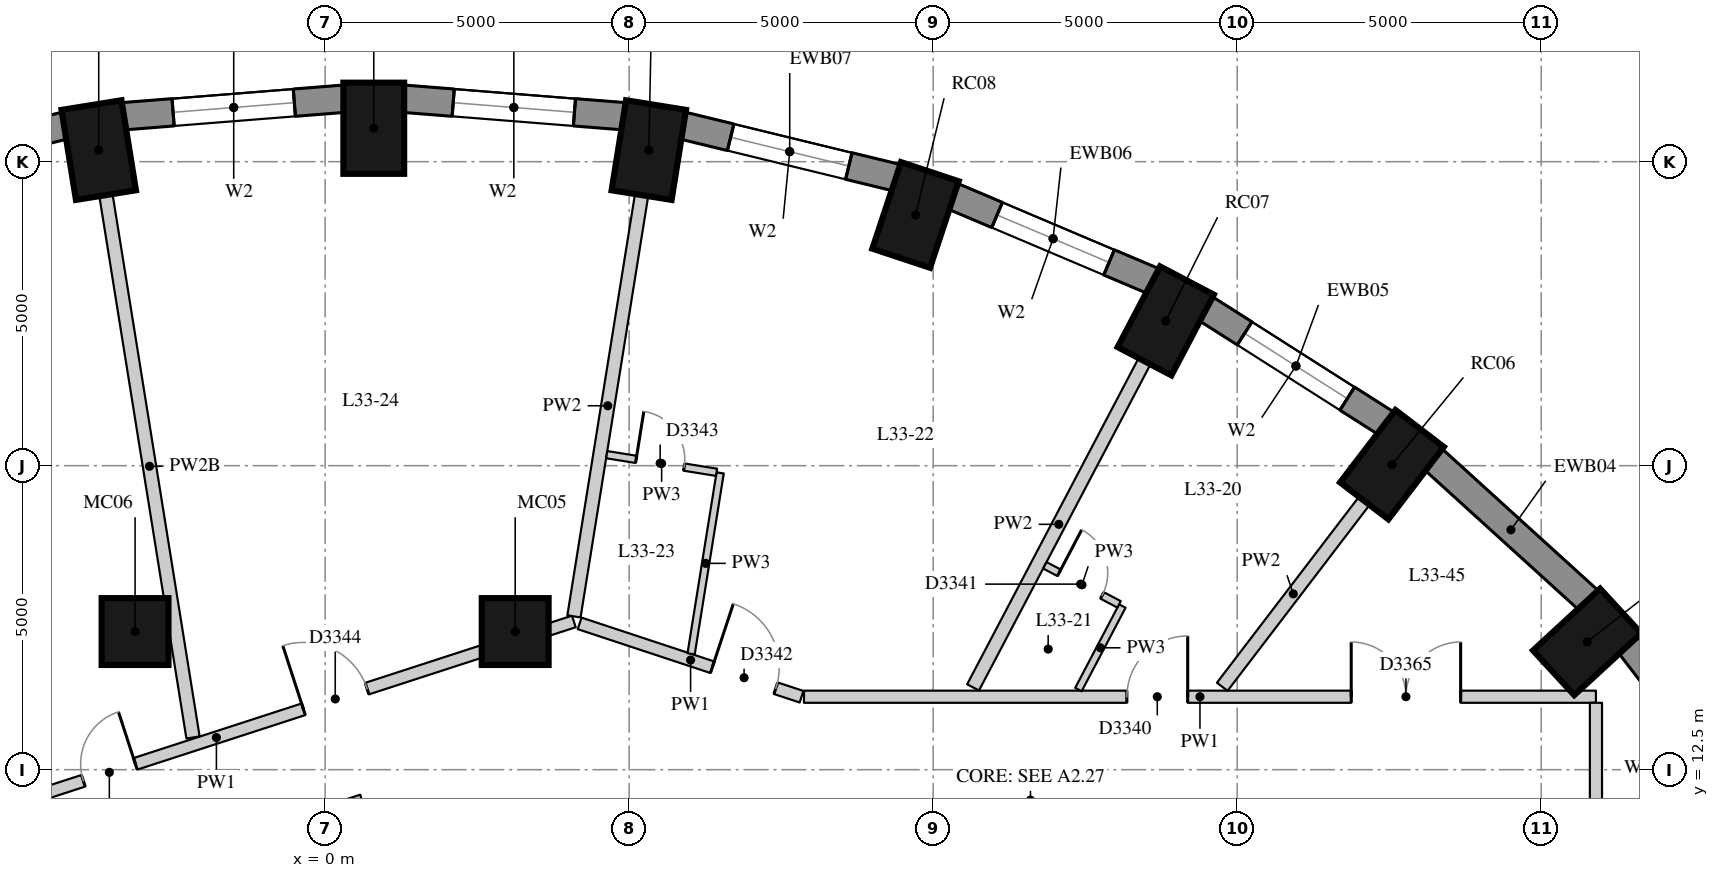
"""IFC4 building model, lengths in metres.
Left out: names, types, materials, properties, quantities, classifications, styles, units other than length and angle.
Written with IfcOpenShell. Run it as: python <this file> out.ifc"""

import sys

from ifc_helpers import new_model, si_unit, direction, frame, frame_2d, origin, origin_2d, place, context, subcontext, project, spatial, rectangle, extrude, element, fill, save


model = new_model("IFC4")
c1 = context("Model", 3, precision=1e-05, world=origin(), true_north=direction((0.0, 1.0)))
c2 = subcontext(c1, "Body", "Model", "MODEL_VIEW")
j1 = project(units=[si_unit("LENGTHUNIT", "METRE"), si_unit("PLANEANGLEUNIT", "RADIAN")], contexts=[c1])
p1 = place(None, origin())
s1 = spatial("IfcSite", under=j1, at=p1, CompositionType="ELEMENT")
p2 = place(p1, origin())
s2 = spatial("IfcBuilding", under=s1, at=p2, CompositionType="ELEMENT")
p3 = place(p2, frame((0.0, 0.0, 118.6)))
s3 = spatial("IfcBuildingStorey", under=s2, at=p3, CompositionType="ELEMENT", Elevation=118.6)
for number, where, z_axis, x_axis in (
    (1, (20.755, 14.602, 0.0), (0.0, 0.0, 1.0), (0.735, 0.678, 0.0)),
    (2, (17.545, 17.517, 0.0), (0.0, 0.0, 1.0), (0.607, 0.795, 0.0)),
    (3, (13.825, 19.882, 0.0), (0.0, 0.0, 1.0), (0.465, 0.885, 0.0)),
    (4, (9.71, 21.624, 0.0), (0.0, 0.0, 1.0), (0.315, 0.949, 0.0)),
    (5, (5.323, 22.691, 0.0), (0.0, 0.0, 1.0), (0.159, 0.987, 0.0)),
    (6, (0.8, 23.05, 0.0), (0.0, 0.0, 1.0), (0.0, 1.0, 0.0)),
    (7, (-3.724, 22.691, 0.0), (0.0, 0.0, 1.0), (-0.159, 0.987, 0.0)),
):
    element("IfcColumn", number, at=place(p3, frame(where, z_axis=z_axis, x_axis=x_axis)), inside=s3, PredefinedType="COLUMN", context=c2, shape_type="SweptSolid", body=[
        extrude(rectangle(XDim=1.5, YDim=1.0, at=origin_2d()), origin(), (0.0, 0.0, 1.0), 3.3),
    ])
for number, where, z_axis, x_axis in (
    (8, (3.126, 14.772, 0.0), (0.0, 0.0, 1.0), (1.0, 0.0, 0.0)),
    (9, (-3.126, 14.772, 0.0), (0.0, 0.0, 1.0), (1.0, 0.0, 0.0)),
):
    element("IfcColumn", number, at=place(p3, frame(where, z_axis=z_axis, x_axis=x_axis)), inside=s3, PredefinedType="COLUMN", context=c2, shape_type="SweptSolid", body=[
        extrude(rectangle(XDim=1.1, YDim=1.1, at=origin_2d()), origin(), (0.0, 0.0, 1.0), 3.3),
    ])
p4 = place(p3, frame((23.508, 11.887, 0.0), z_axis=(0.0, 0.0, 1.0), x_axis=(-0.610693945156, 0.791866721961, 0.0)))
e10 = element("IfcWall", 10, at=p4, inside=s3, PredefinedType="SOLIDWALL", context=c2, shape_type="SweptSolid", body=[
    extrude(rectangle(XDim=3.395, YDim=0.45, at=frame_2d((1.697, 0.0))), origin(), (0.0, 0.0, 1.0), 3.02),
])
p5 = place(p4, frame((1.397, 0.0, 0.4)))
e11 = element("IfcOpeningElement", 11, at=p5, cuts=e10, PredefinedType="OPENING", context=c2, shape_type="SweptSolid", body=[
    extrude(rectangle(XDim=0.6, YDim=1.75, at=frame_2d((0.3, 0.875))), frame((0.0, 0.235, 0.0), z_axis=(0.0, -1.0, 0.0), x_axis=(1.0, 0.0, 0.0)), (0.0, 0.0, 1.0), 0.47),
])
p6 = place(p3, frame((20.784, 15.281, 0.0), z_axis=(0.0, 0.0, 1.0), x_axis=(-0.74032902847, 0.672244694739, 0.0)))
e12 = element("IfcWall", 12, at=p6, inside=s3, PredefinedType="SOLIDWALL", context=c2, shape_type="SweptSolid", body=[
    extrude(rectangle(XDim=3.464, YDim=0.45, at=frame_2d((1.732, 0.0))), origin(), (0.0, 0.0, 1.0), 3.02),
])
p7 = place(p3, frame((17.456, 18.192, 0.0), z_axis=(0.0, 0.0, 1.0), x_axis=(-0.843880549131, 0.536531097699, 0.0)))
e13 = element("IfcWall", 13, at=p7, inside=s3, PredefinedType="SOLIDWALL", context=c2, shape_type="SweptSolid", body=[
    extrude(rectangle(XDim=3.532, YDim=0.45, at=frame_2d((1.766, 0.0))), origin(), (0.0, 0.0, 1.0), 3.02),
])
p8 = place(p7, frame((0.766, 0.0, 0.4)))
e14 = element("IfcOpeningElement", 14, at=p8, cuts=e13, PredefinedType="OPENING", context=c2, shape_type="SweptSolid", body=[
    extrude(rectangle(XDim=2.0, YDim=1.75, at=frame_2d((1.0, 0.875))), frame((0.0, 0.235, 0.0), z_axis=(0.0, -1.0, 0.0), x_axis=(1.0, 0.0, 0.0)), (0.0, 0.0, 1.0), 0.47),
])
p9 = place(p3, frame((13.625, 20.533, 0.0), z_axis=(0.0, 0.0, 1.0), x_axis=(-0.920869643542, 0.389870619055, 0.0)))
e15 = element("IfcWall", 15, at=p9, inside=s3, PredefinedType="SOLIDWALL", context=c2, shape_type="SweptSolid", body=[
    extrude(rectangle(XDim=3.591, YDim=0.45, at=frame_2d((1.796, 0.0))), origin(), (0.0, 0.0, 1.0), 3.02),
])
p10 = place(p9, frame((0.796, 0.0, 0.4)))
e16 = element("IfcOpeningElement", 16, at=p10, cuts=e15, PredefinedType="OPENING", context=c2, shape_type="SweptSolid", body=[
    extrude(rectangle(XDim=2.0, YDim=1.75, at=frame_2d((1.0, 0.875))), frame((0.0, 0.235, 0.0), z_axis=(0.0, -1.0, 0.0), x_axis=(1.0, 0.0, 0.0)), (0.0, 0.0, 1.0), 0.47),
])
p11 = place(p3, frame((9.406, 22.235, 0.0), z_axis=(0.0, 0.0, 1.0), x_axis=(-0.971667603162, 0.236351579148, 0.0)))
e17 = element("IfcWall", 17, at=p11, inside=s3, PredefinedType="SOLIDWALL", context=c2, shape_type="SweptSolid", body=[
    extrude(rectangle(XDim=3.635, YDim=0.45, at=frame_2d((1.817, 0.0))), origin(), (0.0, 0.0, 1.0), 3.02),
])
p12 = place(p11, frame((0.817, 0.0, 0.4)))
e18 = element("IfcOpeningElement", 18, at=p12, cuts=e17, PredefinedType="OPENING", context=c2, shape_type="SweptSolid", body=[
    extrude(rectangle(XDim=2.0, YDim=1.75, at=frame_2d((1.0, 0.875))), frame((0.0, 0.235, 0.0), z_axis=(0.0, -1.0, 0.0), x_axis=(1.0, 0.0, 0.0)), (0.0, 0.0, 1.0), 0.47),
])
p13 = place(p3, frame((4.927, 23.247, 0.0), z_axis=(0.0, 0.0, 1.0), x_axis=(-0.996862216754, 0.079156306178, 0.0)))
e19 = element("IfcWall", 19, at=p13, inside=s3, PredefinedType="SOLIDWALL", context=c2, shape_type="SweptSolid", body=[
    extrude(rectangle(XDim=3.658, YDim=0.45, at=frame_2d((1.829, 0.0))), origin(), (0.0, 0.0, 1.0), 3.02),
])
p14 = place(p13, frame((0.829, 0.0, 0.4)))
e20 = element("IfcOpeningElement", 20, at=p14, cuts=e19, PredefinedType="OPENING", context=c2, shape_type="SweptSolid", body=[
    extrude(rectangle(XDim=2.0, YDim=1.75, at=frame_2d((1.0, 0.875))), frame((0.0, 0.235, 0.0), z_axis=(0.0, -1.0, 0.0), x_axis=(1.0, 0.0, 0.0)), (0.0, 0.0, 1.0), 0.47),
])
p15 = place(p3, frame((0.32, 23.536, 0.0), z_axis=(0.0, 0.0, 1.0), x_axis=(-0.996862216754, -0.079156306178, 0.0)))
e21 = element("IfcWall", 21, at=p15, inside=s3, PredefinedType="SOLIDWALL", context=c2, shape_type="SweptSolid", body=[
    extrude(rectangle(XDim=3.658, YDim=0.45, at=frame_2d((1.829, 0.0))), origin(), (0.0, 0.0, 1.0), 3.02),
])
p16 = place(p15, frame((0.829, 0.0, 0.4)))
e22 = element("IfcOpeningElement", 22, at=p16, cuts=e21, PredefinedType="OPENING", context=c2, shape_type="SweptSolid", body=[
    extrude(rectangle(XDim=2.0, YDim=1.75, at=frame_2d((1.0, 0.875))), frame((0.0, 0.235, 0.0), z_axis=(0.0, -1.0, 0.0), x_axis=(1.0, 0.0, 0.0)), (0.0, 0.0, 1.0), 0.47),
])
p17 = place(p3, frame((-4.275, 23.094, 0.0), z_axis=(0.0, 0.0, 1.0), x_axis=(-0.971667603162, -0.236351579148, 0.0)))
e23 = element("IfcWall", 23, at=p17, inside=s3, PredefinedType="SOLIDWALL", context=c2, shape_type="SweptSolid", body=[
    extrude(rectangle(XDim=3.635, YDim=0.45, at=frame_2d((1.817, 0.0))), origin(), (0.0, 0.0, 1.0), 3.02),
])
p18 = place(p17, frame((0.817, 0.0, 0.4)))
e24 = element("IfcOpeningElement", 24, at=p18, cuts=e23, PredefinedType="OPENING", context=c2, shape_type="SweptSolid", body=[
    extrude(rectangle(XDim=2.0, YDim=1.75, at=frame_2d((1.0, 0.875))), frame((0.0, 0.235, 0.0), z_axis=(0.0, -1.0, 0.0), x_axis=(1.0, 0.0, 0.0)), (0.0, 0.0, 1.0), 0.47),
])
p19 = place(p3, frame((-7.667, 11.119, 0.0), z_axis=(0.0, 0.0, 1.0), x_axis=(0.951088334028, 0.308919052304, 0.0)))
e25 = element("IfcWall", 25, at=p19, inside=s3, PredefinedType="PARTITIONING", context=c2, shape_type="SweptSolid", body=[
    extrude(rectangle(XDim=12.362, YDim=0.2, at=frame_2d((6.181, 0.0))), origin(), (0.0, 0.0, 1.0), 3.02),
])
p20 = place(p19, frame((7.686, 0.0, 0.0)))
e26 = element("IfcOpeningElement", 26, at=p20, cuts=e25, PredefinedType="OPENING", context=c2, shape_type="SweptSolid", body=[
    extrude(rectangle(XDim=1.1, YDim=2.1, at=frame_2d((0.55, 1.05))), frame((0.0, 0.11, 0.0), z_axis=(0.0, -1.0, 0.0), x_axis=(1.0, 0.0, 0.0)), (0.0, 0.0, 1.0), 0.22),
])
p21 = place(p19, frame((3.88, 0.0, 0.0)))
e27 = element("IfcOpeningElement", 27, at=p21, cuts=e25, PredefinedType="OPENING", context=c2, shape_type="SweptSolid", body=[
    extrude(rectangle(XDim=0.9, YDim=2.1, at=frame_2d((0.45, 1.05))), frame((0.0, 0.11, 0.0), z_axis=(0.0, -1.0, 0.0), x_axis=(1.0, 0.0, 0.0)), (0.0, 0.0, 1.0), 0.22),
])
p22 = place(p3, frame((4.186, 14.906, 0.0), z_axis=(0.0, 0.0, 1.0), x_axis=(0.94947428881, -0.313844826131, 0.0)))
e28 = element("IfcWall", 28, at=p22, inside=s3, PredefinedType="PARTITIONING", context=c2, shape_type="SweptSolid", body=[
    extrude(rectangle(XDim=3.844, YDim=0.2, at=frame_2d((1.922, 0.0))), origin(), (0.0, 0.0, 1.0), 3.02),
])
p23 = place(p22, frame((2.298, 0.0, 0.0)))
e29 = element("IfcOpeningElement", 29, at=p23, cuts=e28, PredefinedType="OPENING", context=c2, shape_type="SweptSolid", body=[
    extrude(rectangle(XDim=1.1, YDim=2.1, at=frame_2d((0.55, 1.05))), frame((0.0, 0.11, 0.0), z_axis=(0.0, -1.0, 0.0), x_axis=(1.0, 0.0, 0.0)), (0.0, 0.0, 1.0), 0.22),
])
p24 = place(p3, frame((7.875, 13.7, 0.0), z_axis=(0.0, 0.0, 1.0), x_axis=(1.0, 0.0, 0.0)))
e30 = element("IfcWall", 30, at=p24, inside=s3, PredefinedType="PARTITIONING", context=c2, shape_type="SweptSolid", body=[
    extrude(rectangle(XDim=13.025, YDim=0.2, at=frame_2d((6.512, 0.0))), origin(), (0.0, 0.0, 1.0), 3.02),
])
p25 = place(p24, frame((5.311, 0.0, 0.0)))
e31 = element("IfcOpeningElement", 31, at=p25, cuts=e30, PredefinedType="OPENING", context=c2, shape_type="SweptSolid", body=[
    extrude(rectangle(XDim=1.0, YDim=2.1, at=frame_2d((0.5, 1.05))), frame((0.0, 0.11, 0.0), z_axis=(0.0, -1.0, 0.0), x_axis=(1.0, 0.0, 0.0)), (0.0, 0.0, 1.0), 0.22),
])
p26 = place(p24, frame((9.0, 0.0, 0.0)))
e32 = element("IfcOpeningElement", 32, at=p26, cuts=e30, PredefinedType="OPENING", context=c2, shape_type="SweptSolid", body=[
    extrude(rectangle(XDim=1.8, YDim=2.1, at=frame_2d((0.9, 1.05))), frame((0.0, 0.11, 0.0), z_axis=(0.0, -1.0, 0.0), x_axis=(1.0, 0.0, 0.0)), (0.0, 0.0, 1.0), 0.22),
])
p27 = place(p3, frame((20.9, 13.6, 0.0), z_axis=(0.0, 0.0, 1.0), x_axis=(0.0, -1.0, 0.0)))
e33 = element("IfcWall", 33, at=p27, inside=s3, PredefinedType="PARTITIONING", context=c2, shape_type="SweptSolid", body=[
    extrude(rectangle(XDim=27.3, YDim=0.2, at=frame_2d((13.65, 0.0))), origin(), (0.0, 0.0, 1.0), 3.02),
])
p28 = place(p27, frame((18.433, 0.0, 0.0)))
e34 = element("IfcOpeningElement", 34, at=p28, cuts=e33, PredefinedType="OPENING", context=c2, shape_type="SweptSolid", body=[
    extrude(rectangle(XDim=1.8, YDim=2.1, at=frame_2d((0.9, 1.05))), frame((0.0, 0.11, 0.0), z_axis=(0.0, -1.0, 0.0), x_axis=(1.0, 0.0, 0.0)), (0.0, 0.0, 1.0), 0.22),
])
p29 = place(p27, frame((8.167, 0.0, 0.0)))
e35 = element("IfcOpeningElement", 35, at=p29, cuts=e33, PredefinedType="OPENING", context=c2, shape_type="SweptSolid", body=[
    extrude(rectangle(XDim=1.8, YDim=2.1, at=frame_2d((0.9, 1.05))), frame((0.0, 0.11, 0.0), z_axis=(0.0, -1.0, 0.0), x_axis=(1.0, 0.0, 0.0)), (0.0, 0.0, 1.0), 0.22),
])
p30 = place(p3, frame((-4.5, 10.361, 0.0), z_axis=(0.0, 0.0, 1.0), x_axis=(0.951090931116, 0.308911056372, 0.0)))
e36 = element("IfcWall", 36, at=p30, inside=s3, PredefinedType="PARTITIONING", context=c2, shape_type="SweptSolid", body=[
    extrude(rectangle(XDim=5.362, YDim=0.15, at=frame_2d((2.681, 0.0))), origin(), (0.0, 0.0, 1.0), 3.02),
])
p31 = place(p30, frame((2.231, 0.0, 0.0)))
e37 = element("IfcOpeningElement", 37, at=p31, cuts=e36, PredefinedType="OPENING", context=c2, shape_type="SweptSolid", body=[
    extrude(rectangle(XDim=0.9, YDim=2.1, at=frame_2d((0.45, 1.05))), frame((0.0, 0.085, 0.0), z_axis=(0.0, -1.0, 0.0), x_axis=(1.0, 0.0, 0.0)), (0.0, 0.0, 1.0), 0.17),
])
p32 = place(p3, frame((17.089, 16.921, 0.0), z_axis=(0.0, 0.0, 1.0), x_axis=(-0.607033117359, -0.794676534465, 0.0)))
e38 = element("IfcWall", 38, at=p32, inside=s3, PredefinedType="PARTITIONING", context=c2, shape_type="SweptSolid", body=[
    extrude(rectangle(XDim=3.847, YDim=0.22, at=frame_2d((1.924, 0.0))), origin(), (0.0, 0.0, 1.0), 3.02),
])
p33 = place(p3, frame((13.476, 19.218, 0.0), z_axis=(0.0, 0.0, 1.0), x_axis=(-0.465346231977, -0.885128738876, 0.0)))
e39 = element("IfcWall", 39, at=p33, inside=s3, PredefinedType="PARTITIONING", context=c2, shape_type="SweptSolid", body=[
    extrude(rectangle(XDim=6.06, YDim=0.22, at=frame_2d((3.03, 0.0))), origin(), (0.0, 0.0, 1.0), 3.02),
])
p34 = place(p3, frame((5.205, 21.95, 0.0), z_axis=(0.0, 0.0, 1.0), x_axis=(-0.158500652659, -0.987358872501, 0.0)))
e40 = element("IfcWall", 40, at=p34, inside=s3, PredefinedType="PARTITIONING", context=c2, shape_type="SweptSolid", body=[
    extrude(rectangle(XDim=7.018, YDim=0.22, at=frame_2d((3.509, 0.0))), origin(), (0.0, 0.0, 1.0), 3.02),
])
p35 = place(p3, frame((-3.605, 21.95, 0.0), z_axis=(0.0, 0.0, 1.0), x_axis=(0.158519564718, -0.987355836364, 0.0)))
e41 = element("IfcWall", 41, at=p35, inside=s3, PredefinedType="PARTITIONING", context=c2, shape_type="SweptSolid", body=[
    extrude(rectangle(XDim=9.034, YDim=0.22, at=frame_2d((4.517, 0.0))), origin(), (0.0, 0.0, 1.0), 2.57),
])
p36 = place(p3, frame((12.389, 13.818, 0.0), z_axis=(0.0, 0.0, 1.0), x_axis=(0.465305514099, 0.885150144636, 0.0)))
e42 = element("IfcWall", 42, at=p36, inside=s3, PredefinedType="PARTITIONING", context=c2, shape_type="SweptSolid", body=[
    extrude(rectangle(XDim=1.552, YDim=0.12, at=frame_2d((0.776, 0.0))), origin(), (0.0, 0.0, 1.0), 3.02),
])
p37 = place(p3, frame((6.019, 14.406, 0.0), z_axis=(0.0, 0.0, 1.0), x_axis=(0.158524395275, 0.987355060808, 0.0)))
e43 = element("IfcWall", 43, at=p37, inside=s3, PredefinedType="PARTITIONING", context=c2, shape_type="SweptSolid", body=[
    extrude(rectangle(XDim=3.014, YDim=0.12, at=frame_2d((1.507, 0.0))), origin(), (0.0, 0.0, 1.0), 3.02),
])
p38 = place(p3, frame((13.057, 15.219, 0.0), z_axis=(0.0, 0.0, 1.0), x_axis=(-0.885071735195, 0.465454641784, 0.0)))
e44 = element("IfcWall", 44, at=p38, inside=s3, PredefinedType="PARTITIONING", context=c2, shape_type="SweptSolid", body=[
    extrude(rectangle(XDim=1.379, YDim=0.12, at=frame_2d((0.69, 0.0))), origin(), (0.0, 0.0, 1.0), 3.02),
])
p39 = place(p38, frame((0.315, 0.0, 0.0)))
e45 = element("IfcOpeningElement", 45, at=p39, cuts=e44, PredefinedType="OPENING", context=c2, shape_type="SweptSolid", body=[
    extrude(rectangle(XDim=0.8, YDim=2.1, at=frame_2d((0.4, 1.05))), frame((0.0, 0.07, 0.0), z_axis=(0.0, -1.0, 0.0), x_axis=(1.0, 0.0, 0.0)), (0.0, 0.0, 1.0), 0.14),
])
p40 = place(p3, frame((6.438, 17.391, 0.0), z_axis=(0.0, 0.0, 1.0), x_axis=(-0.987336342922, 0.158640934018, 0.0)))
e46 = element("IfcWall", 46, at=p40, inside=s3, PredefinedType="PARTITIONING", context=c2, shape_type="SweptSolid", body=[
    extrude(rectangle(XDim=1.83, YDim=0.12, at=frame_2d((0.915, 0.0))), origin(), (0.0, 0.0, 1.0), 3.02),
])
p41 = place(p40, frame((0.54, 0.0, 0.0)))
e47 = element("IfcOpeningElement", 47, at=p41, cuts=e46, PredefinedType="OPENING", context=c2, shape_type="SweptSolid", body=[
    extrude(rectangle(XDim=0.8, YDim=2.1, at=frame_2d((0.4, 1.05))), frame((0.0, 0.07, 0.0), z_axis=(0.0, -1.0, 0.0), x_axis=(1.0, 0.0, 0.0)), (0.0, 0.0, 1.0), 0.14),
])
p42 = place(p8, origin())
e48 = element("IfcWindow", 48, at=p42, inside=s3, PartitioningType="SINGLE_PANEL", PredefinedType="WINDOW", context=c2, shape_type="SweptSolid", body=[
    extrude(rectangle(XDim=2.0, YDim=1.75, at=frame_2d((1.0, 0.875))), frame((0.0, 0.035, 0.0), z_axis=(0.0, -1.0, 0.0), x_axis=(1.0, 0.0, 0.0)), (0.0, 0.0, 1.0), 0.06),
])
fill(e14, e48)
p43 = place(p10, origin())
e49 = element("IfcWindow", 49, at=p43, inside=s3, PartitioningType="SINGLE_PANEL", PredefinedType="WINDOW", context=c2, shape_type="SweptSolid", body=[
    extrude(rectangle(XDim=2.0, YDim=1.75, at=frame_2d((1.0, 0.875))), frame((0.0, 0.035, 0.0), z_axis=(0.0, -1.0, 0.0), x_axis=(1.0, 0.0, 0.0)), (0.0, 0.0, 1.0), 0.06),
])
fill(e16, e49)
p44 = place(p12, origin())
e50 = element("IfcWindow", 50, at=p44, inside=s3, PartitioningType="SINGLE_PANEL", PredefinedType="WINDOW", context=c2, shape_type="SweptSolid", body=[
    extrude(rectangle(XDim=2.0, YDim=1.75, at=frame_2d((1.0, 0.875))), frame((0.0, 0.035, 0.0), z_axis=(0.0, -1.0, 0.0), x_axis=(1.0, 0.0, 0.0)), (0.0, 0.0, 1.0), 0.06),
])
fill(e18, e50)
p45 = place(p14, origin())
e51 = element("IfcWindow", 51, at=p45, inside=s3, PartitioningType="SINGLE_PANEL", PredefinedType="WINDOW", context=c2, shape_type="SweptSolid", body=[
    extrude(rectangle(XDim=2.0, YDim=1.75, at=frame_2d((1.0, 0.875))), frame((0.0, 0.035, 0.0), z_axis=(0.0, -1.0, 0.0), x_axis=(1.0, 0.0, 0.0)), (0.0, 0.0, 1.0), 0.06),
])
fill(e20, e51)
p46 = place(p16, origin())
e52 = element("IfcWindow", 52, at=p46, inside=s3, PartitioningType="SINGLE_PANEL", PredefinedType="WINDOW", context=c2, shape_type="SweptSolid", body=[
    extrude(rectangle(XDim=2.0, YDim=1.75, at=frame_2d((1.0, 0.875))), frame((0.0, 0.035, 0.0), z_axis=(0.0, -1.0, 0.0), x_axis=(1.0, 0.0, 0.0)), (0.0, 0.0, 1.0), 0.06),
])
fill(e22, e52)
p47 = place(p25, origin())
e53 = element("IfcDoor", 53, at=p47, inside=s3, OperationType="SINGLE_SWING_RIGHT", PredefinedType="DOOR", context=c2, shape_type="SweptSolid", body=[
    extrude(rectangle(XDim=1.0, YDim=2.1, at=frame_2d((0.5, 1.05))), frame((0.0, 0.025, 0.0), z_axis=(0.0, -1.0, 0.0), x_axis=(1.0, 0.0, 0.0)), (0.0, 0.0, 1.0), 0.05),
])
fill(e31, e53)
p48 = place(p39, origin())
e54 = element("IfcDoor", 54, at=p48, inside=s3, OperationType="SINGLE_SWING_LEFT", PredefinedType="DOOR", context=c2, shape_type="SweptSolid", body=[
    extrude(rectangle(XDim=0.8, YDim=2.1, at=frame_2d((0.4, 1.05))), frame((0.0, 0.025, 0.0), z_axis=(0.0, -1.0, 0.0), x_axis=(1.0, 0.0, 0.0)), (0.0, 0.0, 1.0), 0.05),
])
fill(e45, e54)
p49 = place(p23, origin())
e55 = element("IfcDoor", 55, at=p49, inside=s3, OperationType="SINGLE_SWING_LEFT", PredefinedType="DOOR", context=c2, shape_type="SweptSolid", body=[
    extrude(rectangle(XDim=1.1, YDim=2.1, at=frame_2d((0.55, 1.05))), frame((0.0, 0.025, 0.0), z_axis=(0.0, -1.0, 0.0), x_axis=(1.0, 0.0, 0.0)), (0.0, 0.0, 1.0), 0.05),
])
fill(e29, e55)
p50 = place(p41, origin())
e56 = element("IfcDoor", 56, at=p50, inside=s3, OperationType="SINGLE_SWING_LEFT", PredefinedType="DOOR", context=c2, shape_type="SweptSolid", body=[
    extrude(rectangle(XDim=0.8, YDim=2.1, at=frame_2d((0.4, 1.05))), frame((0.0, 0.025, 0.0), z_axis=(0.0, -1.0, 0.0), x_axis=(1.0, 0.0, 0.0)), (0.0, 0.0, 1.0), 0.05),
])
fill(e47, e56)
p51 = place(p20, origin())
e57 = element("IfcDoor", 57, at=p51, inside=s3, OperationType="SINGLE_SWING_LEFT", PredefinedType="DOOR", context=c2, shape_type="SweptSolid", body=[
    extrude(rectangle(XDim=1.1, YDim=2.1, at=frame_2d((0.55, 1.05))), frame((0.0, 0.025, 0.0), z_axis=(0.0, -1.0, 0.0), x_axis=(1.0, 0.0, 0.0)), (0.0, 0.0, 1.0), 0.05),
])
fill(e26, e57)
p52 = place(p21, origin())
e58 = element("IfcDoor", 58, at=p52, inside=s3, OperationType="SINGLE_SWING_RIGHT", PredefinedType="DOOR", context=c2, shape_type="SweptSolid", body=[
    extrude(rectangle(XDim=0.9, YDim=2.1, at=frame_2d((0.45, 1.05))), frame((0.0, 0.025, 0.0), z_axis=(0.0, -1.0, 0.0), x_axis=(1.0, 0.0, 0.0)), (0.0, 0.0, 1.0), 0.05),
])
fill(e27, e58)
p53 = place(p26, origin())
e59 = element("IfcDoor", 59, at=p53, inside=s3, OperationType="DOUBLE_DOOR_SINGLE_SWING", PredefinedType="DOOR", context=c2, shape_type="SweptSolid", body=[
    extrude(rectangle(XDim=1.8, YDim=2.1, at=frame_2d((0.9, 1.05))), frame((0.0, 0.025, 0.0), z_axis=(0.0, -1.0, 0.0), x_axis=(1.0, 0.0, 0.0)), (0.0, 0.0, 1.0), 0.05),
])
fill(e32, e59)
save(model, sys.argv[1])
